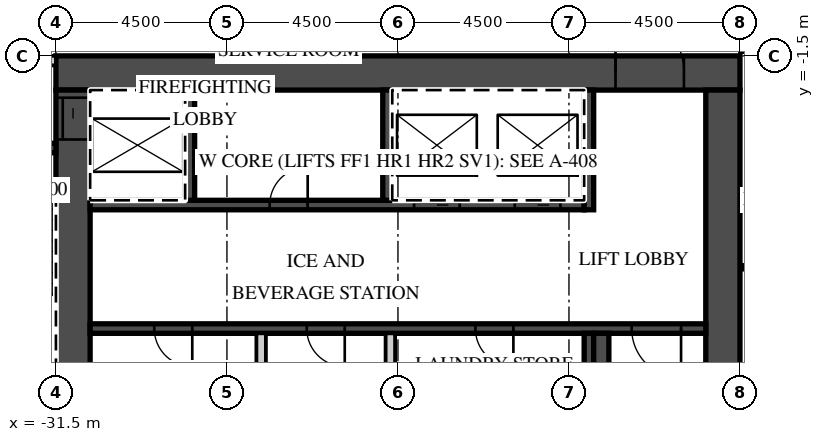
"""IFC4 building model, lengths in metres.
Left out: names, types, materials, properties, quantities, classifications, styles, units other than length and angle.
Written with IfcOpenShell. Run it as: python <this file> out.ifc"""

import sys

from ifc_helpers import new_model, si_unit, direction, frame, frame_2d, origin, place, context, subcontext, project, spatial, rectangle, extrude, element, fill, save


model = new_model("IFC4")
c1 = context("Model", 3, precision=1e-05, world=origin(), true_north=direction((0.0, 1.0)))
c2 = subcontext(c1, "Body", "Model", "MODEL_VIEW")
j1 = project(units=[si_unit("LENGTHUNIT", "METRE"), si_unit("PLANEANGLEUNIT", "RADIAN")], contexts=[c1])
p1 = place(None, origin())
s1 = spatial("IfcSite", under=j1, at=p1, CompositionType="ELEMENT")
p2 = place(p1, origin())
s2 = spatial("IfcBuilding", under=s1, at=p2, CompositionType="ELEMENT")
p3 = place(p2, frame((0.0, 0.0, 298.2)))
s3 = spatial("IfcBuildingStorey", under=s2, at=p3, CompositionType="ELEMENT", Elevation=298.2)
p4 = place(p3, frame((-13.5, -1.3, 0.0), z_axis=(0.0, 0.0, 1.0), x_axis=(1.0, 0.0, 0.0)))
e1 = element("IfcWall", 1, at=p4, inside=s3, PredefinedType="PARTITIONING", context=c2, shape_type="SweptSolid", body=[
    extrude(rectangle(XDim=50.293, YDim=0.2, at=frame_2d((25.146, 0.0))), origin(), (0.0, 0.0, 1.0), 3.02),
])
p5 = place(p4, frame((2.925, 0.0, 0.0)))
e2 = element("IfcOpeningElement", 2, at=p5, cuts=e1, PredefinedType="OPENING", context=c2, shape_type="SweptSolid", body=[
    extrude(rectangle(XDim=1.0, YDim=2.1, at=frame_2d((0.5, 1.05))), frame((0.0, 0.11, 0.0), z_axis=(0.0, -1.0, 0.0), x_axis=(1.0, 0.0, 0.0)), (0.0, 0.0, 1.0), 0.22),
])
p6 = place(p4, frame((7.45, 0.0, 0.0)))
e3 = element("IfcOpeningElement", 3, at=p6, cuts=e1, PredefinedType="OPENING", context=c2, shape_type="SweptSolid", body=[
    extrude(rectangle(XDim=1.0, YDim=2.1, at=frame_2d((0.5, 1.05))), frame((0.0, 0.11, 0.0), z_axis=(0.0, -1.0, 0.0), x_axis=(1.0, 0.0, 0.0)), (0.0, 0.0, 1.0), 0.22),
])
p7 = place(p4, frame((9.55, 0.0, 0.0)))
e4 = element("IfcOpeningElement", 4, at=p7, cuts=e1, PredefinedType="OPENING", context=c2, shape_type="SweptSolid", body=[
    extrude(rectangle(XDim=1.0, YDim=2.1, at=frame_2d((0.5, 1.05))), frame((0.0, 0.11, 0.0), z_axis=(0.0, -1.0, 0.0), x_axis=(1.0, 0.0, 0.0)), (0.0, 0.0, 1.0), 0.22),
])
p8 = place(p4, frame((18.862, 0.0, 0.0)))
e5 = element("IfcOpeningElement", 5, at=p8, cuts=e1, PredefinedType="OPENING", context=c2, shape_type="SweptSolid", body=[
    extrude(rectangle(XDim=1.2, YDim=2.1, at=frame_2d((0.6, 1.05))), frame((0.0, 0.11, 0.0), z_axis=(0.0, -1.0, 0.0), x_axis=(1.0, 0.0, 0.0)), (0.0, 0.0, 1.0), 0.22),
])
p9 = place(p4, frame((23.075, 0.0, 0.0)))
e6 = element("IfcOpeningElement", 6, at=p9, cuts=e1, PredefinedType="OPENING", context=c2, shape_type="SweptSolid", body=[
    extrude(rectangle(XDim=1.0, YDim=2.1, at=frame_2d((0.5, 1.05))), frame((0.0, 0.11, 0.0), z_axis=(0.0, -1.0, 0.0), x_axis=(1.0, 0.0, 0.0)), (0.0, 0.0, 1.0), 0.22),
])
p10 = place(p4, frame((29.925, 0.0, 0.0)))
e7 = element("IfcOpeningElement", 7, at=p10, cuts=e1, PredefinedType="OPENING", context=c2, shape_type="SweptSolid", body=[
    extrude(rectangle(XDim=1.0, YDim=2.1, at=frame_2d((0.5, 1.05))), frame((0.0, 0.11, 0.0), z_axis=(0.0, -1.0, 0.0), x_axis=(1.0, 0.0, 0.0)), (0.0, 0.0, 1.0), 0.22),
])
p11 = place(p4, frame((33.938, 0.0, 0.0)))
e8 = element("IfcOpeningElement", 8, at=p11, cuts=e1, PredefinedType="OPENING", context=c2, shape_type="SweptSolid", body=[
    extrude(rectangle(XDim=1.2, YDim=2.1, at=frame_2d((0.6, 1.05))), frame((0.0, 0.11, 0.0), z_axis=(0.0, -1.0, 0.0), x_axis=(1.0, 0.0, 0.0)), (0.0, 0.0, 1.0), 0.22),
])
p12 = place(p4, frame((43.45, 0.0, 0.0)))
e9 = element("IfcOpeningElement", 9, at=p12, cuts=e1, PredefinedType="OPENING", context=c2, shape_type="SweptSolid", body=[
    extrude(rectangle(XDim=1.0, YDim=2.1, at=frame_2d((0.5, 1.05))), frame((0.0, 0.11, 0.0), z_axis=(0.0, -1.0, 0.0), x_axis=(1.0, 0.0, 0.0)), (0.0, 0.0, 1.0), 0.22),
])
p13 = place(p4, frame((45.55, 0.0, 0.0)))
e10 = element("IfcOpeningElement", 10, at=p13, cuts=e1, PredefinedType="OPENING", context=c2, shape_type="SweptSolid", body=[
    extrude(rectangle(XDim=1.0, YDim=2.1, at=frame_2d((0.5, 1.05))), frame((0.0, 0.11, 0.0), z_axis=(0.0, -1.0, 0.0), x_axis=(1.0, 0.0, 0.0)), (0.0, 0.0, 1.0), 0.22),
])
p14 = place(p3, frame((-31.5, -1.95, 0.0), z_axis=(0.0, 0.0, 1.0), x_axis=(1.0, 0.0, 0.0)))
e11 = element("IfcWall", 11, at=p14, inside=s3, PredefinedType="SHEAR", context=c2, shape_type="SweptSolid", body=[
    extrude(rectangle(XDim=18.0, YDim=0.9, at=frame_2d((9.0, 0.0))), origin(), (0.0, 0.0, 1.0), 3.02),
])
p15 = place(p14, frame((14.725, 0.0, 0.0)))
e12 = element("IfcOpeningElement", 12, at=p15, cuts=e11, PredefinedType="OPENING", context=c2, shape_type="SweptSolid", body=[
    extrude(rectangle(XDim=1.8, YDim=2.1, at=frame_2d((0.9, 1.05))), frame((0.0, 0.46, 0.0), z_axis=(0.0, -1.0, 0.0), x_axis=(1.0, 0.0, 0.0)), (0.0, 0.0, 1.0), 0.92),
])
p16 = place(p3, frame((-31.05, -15.2, 0.0), z_axis=(0.0, 0.0, 1.0), x_axis=(0.0, 1.0, 0.0)))
e13 = element("IfcWall", 13, at=p16, inside=s3, PredefinedType="SHEAR", context=c2, shape_type="SweptSolid", body=[
    extrude(rectangle(XDim=12.8, YDim=0.9, at=frame_2d((6.4, 0.0))), origin(), (0.0, 0.0, 1.0), 3.02),
])
p17 = place(p16, frame((11.5, 0.0, 0.0)))
e14 = element("IfcOpeningElement", 14, at=p17, cuts=e13, PredefinedType="OPENING", context=c2, shape_type="SweptSolid", body=[
    extrude(rectangle(XDim=1.1, YDim=2.1, at=frame_2d((0.55, 1.05))), frame((0.0, 0.46, 0.0), z_axis=(0.0, -1.0, 0.0), x_axis=(1.0, 0.0, 0.0)), (0.0, 0.0, 1.0), 0.92),
])
p18 = place(p3, frame((-13.95, -14.6, 0.0), z_axis=(0.0, 0.0, 1.0), x_axis=(0.0, 1.0, 0.0)))
e15 = element("IfcWall", 15, at=p18, inside=s3, PredefinedType="SHEAR", context=c2, shape_type="SweptSolid", body=[
    extrude(rectangle(XDim=12.2, YDim=0.9, at=frame_2d((6.1, 0.0))), origin(), (0.0, 0.0, 1.0), 3.02),
])
p19 = place(p3, frame((-30.6, -5.425, 0.0), z_axis=(0.0, 0.0, 1.0), x_axis=(1.0, 0.0, 0.0)))
e16 = element("IfcWall", 16, at=p19, inside=s3, PredefinedType="SHEAR", context=c2, shape_type="SweptSolid", body=[
    extrude(rectangle(XDim=13.0, YDim=0.25, at=frame_2d((6.5, 0.0))), origin(), (0.0, 0.0, 1.0), 3.02),
])
p20 = place(p19, frame((8.525, 0.0, 0.0)))
e17 = element("IfcOpeningElement", 17, at=p20, cuts=e16, PredefinedType="OPENING", context=c2, shape_type="SweptSolid", body=[
    extrude(rectangle(XDim=1.2, YDim=2.1, at=frame_2d((0.6, 1.05))), frame((0.0, 0.135, 0.0), z_axis=(0.0, -1.0, 0.0), x_axis=(1.0, 0.0, 0.0)), (0.0, 0.0, 1.0), 0.27),
])
p21 = place(p19, frame((11.175, 0.0, 0.0)))
e18 = element("IfcOpeningElement", 18, at=p21, cuts=e16, PredefinedType="OPENING", context=c2, shape_type="SweptSolid", body=[
    extrude(rectangle(XDim=1.2, YDim=2.1, at=frame_2d((0.6, 1.05))), frame((0.0, 0.135, 0.0), z_axis=(0.0, -1.0, 0.0), x_axis=(1.0, 0.0, 0.0)), (0.0, 0.0, 1.0), 0.27),
])
p22 = place(p19, frame((4.725, 0.0, 0.0)))
e19 = element("IfcOpeningElement", 19, at=p22, cuts=e16, PredefinedType="OPENING", context=c2, shape_type="SweptSolid", body=[
    extrude(rectangle(XDim=1.0, YDim=2.1, at=frame_2d((0.5, 1.05))), frame((0.0, 0.135, 0.0), z_axis=(0.0, -1.0, 0.0), x_axis=(1.0, 0.0, 0.0)), (0.0, 0.0, 1.0), 0.27),
])
p23 = place(p3, frame((-17.475, -5.55, 0.0), z_axis=(0.0, 0.0, 1.0), x_axis=(0.0, 1.0, 0.0)))
e20 = element("IfcWall", 20, at=p23, inside=s3, PredefinedType="SHEAR", context=c2, shape_type="SweptSolid", body=[
    extrude(rectangle(XDim=3.15, YDim=0.25, at=frame_2d((1.575, 0.0))), origin(), (0.0, 0.0, 1.0), 3.02),
])
for number, where, z_axis, x_axis in (
    (21, (-27.975, -5.3, 0.0), (0.0, 0.0, 1.0), (0.0, 1.0, 0.0)),
    (22, (-22.775, -5.3, 0.0), (0.0, 0.0, 1.0), (0.0, 1.0, 0.0)),
):
    element("IfcWall", number, at=place(p3, frame(where, z_axis=z_axis, x_axis=x_axis)), inside=s3, PredefinedType="SHEAR", context=c2, shape_type="SweptSolid", body=[
        extrude(rectangle(XDim=2.9, YDim=0.25, at=frame_2d((1.45, 0.0))), origin(), (0.0, 0.0, 1.0), 3.02),
    ])
p24 = place(p3, frame((-30.6, -8.675, 0.0), z_axis=(0.0, 0.0, 1.0), x_axis=(1.0, 0.0, 0.0)))
e23 = element("IfcWall", 23, at=p24, inside=s3, PredefinedType="SHEAR", context=c2, shape_type="SweptSolid", body=[
    extrude(rectangle(XDim=16.2, YDim=0.25, at=frame_2d((8.1, 0.0))), origin(), (0.0, 0.0, 1.0), 3.02),
])
p25 = place(p24, frame((14.25, 0.0, 0.0)))
e24 = element("IfcOpeningElement", 24, at=p25, cuts=e23, PredefinedType="OPENING", context=c2, shape_type="SweptSolid", body=[
    extrude(rectangle(XDim=1.3, YDim=2.1, at=frame_2d((0.65, 1.05))), frame((0.0, 0.135, 0.0), z_axis=(0.0, -1.0, 0.0), x_axis=(1.0, 0.0, 0.0)), (0.0, 0.0, 1.0), 0.27),
])
p26 = place(p24, frame((1.688, 0.0, 0.0)))
e25 = element("IfcOpeningElement", 25, at=p26, cuts=e23, PredefinedType="OPENING", context=c2, shape_type="SweptSolid", body=[
    extrude(rectangle(XDim=1.0, YDim=2.1, at=frame_2d((0.5, 1.05))), frame((0.0, 0.135, 0.0), z_axis=(0.0, -1.0, 0.0), x_axis=(1.0, 0.0, 0.0)), (0.0, 0.0, 1.0), 0.27),
])
p27 = place(p24, frame((5.7, 0.0, 0.0)))
e26 = element("IfcOpeningElement", 26, at=p27, cuts=e23, PredefinedType="OPENING", context=c2, shape_type="SweptSolid", body=[
    extrude(rectangle(XDim=1.0, YDim=2.1, at=frame_2d((0.5, 1.05))), frame((0.0, 0.135, 0.0), z_axis=(0.0, -1.0, 0.0), x_axis=(1.0, 0.0, 0.0)), (0.0, 0.0, 1.0), 0.27),
])
p28 = place(p24, frame((10.137, 0.0, 0.0)))
e27 = element("IfcOpeningElement", 27, at=p28, cuts=e23, PredefinedType="OPENING", context=c2, shape_type="SweptSolid", body=[
    extrude(rectangle(XDim=1.0, YDim=2.1, at=frame_2d((0.5, 1.05))), frame((0.0, 0.135, 0.0), z_axis=(0.0, -1.0, 0.0), x_axis=(1.0, 0.0, 0.0)), (0.0, 0.0, 1.0), 0.27),
])
p29 = place(p3, frame((-17.475, -11.7, 0.0), z_axis=(0.0, 0.0, 1.0), x_axis=(0.0, 1.0, 0.0)))
e28 = element("IfcWall", 28, at=p29, inside=s3, PredefinedType="SHEAR", context=c2, shape_type="SweptSolid", body=[
    extrude(rectangle(XDim=2.9, YDim=0.25, at=frame_2d((1.45, 0.0))), origin(), (0.0, 0.0, 1.0), 3.02),
])
for number, where, z_axis, x_axis in (
    (29, (-26.1, -11.7, 0.0), (0.0, 0.0, 1.0), (0.0, 1.0, 0.0)),
    (30, (-22.7, -11.7, 0.0), (0.0, 0.0, 1.0), (0.0, 1.0, 0.0)),
):
    element("IfcWall", number, at=place(p3, frame(where, z_axis=z_axis, x_axis=x_axis)), inside=s3, PredefinedType="PARTITIONING", context=c2, shape_type="SweptSolid", body=[
        extrude(rectangle(XDim=2.9, YDim=0.25, at=frame_2d((1.45, 0.0))), origin(), (0.0, 0.0, 1.0), 3.02),
    ])
p30 = place(p3, frame((-17.15, -14.6, 0.0), z_axis=(0.0, 0.0, 1.0), x_axis=(0.0, 1.0, 0.0)))
e31 = element("IfcWall", 31, at=p30, inside=s3, PredefinedType="SHEAR", context=c2, shape_type="SweptSolid", body=[
    extrude(rectangle(XDim=5.8, YDim=0.4, at=frame_2d((2.9, 0.0))), origin(), (0.0, 0.0, 1.0), 3.02),
])
p31 = place(p3, frame((-39.627, -1.625, 0.0), z_axis=(0.0, 0.0, 1.0), x_axis=(1.0, 0.0, 0.0)))
e32 = element("IfcWall", 32, at=p31, inside=s3, PredefinedType="PARTITIONING", context=c2, shape_type="SweptSolid", body=[
    extrude(rectangle(XDim=8.127, YDim=0.25, at=frame_2d((4.063, 0.0))), origin(), (0.0, 0.0, 1.0), 3.02),
])
p32 = place(p31, frame((6.202, 0.0, 0.0)))
e33 = element("IfcOpeningElement", 33, at=p32, cuts=e32, PredefinedType="OPENING", context=c2, shape_type="SweptSolid", body=[
    extrude(rectangle(XDim=1.3, YDim=2.1, at=frame_2d((0.65, 1.05))), frame((0.0, 0.135, 0.0), z_axis=(0.0, -1.0, 0.0), x_axis=(1.0, 0.0, 0.0)), (0.0, 0.0, 1.0), 0.27),
])
p33 = place(p31, frame((3.777, 0.0, 0.0)))
e34 = element("IfcOpeningElement", 34, at=p33, cuts=e32, PredefinedType="OPENING", context=c2, shape_type="SweptSolid", body=[
    extrude(rectangle(XDim=1.1, YDim=2.1, at=frame_2d((0.55, 1.05))), frame((0.0, 0.135, 0.0), z_axis=(0.0, -1.0, 0.0), x_axis=(1.0, 0.0, 0.0)), (0.0, 0.0, 1.0), 0.27),
])
p34 = place(p3, frame((-34.05, -3.925, 0.0), z_axis=(0.0, 0.0, 1.0), x_axis=(1.0, 0.0, 0.0)))
e35 = element("IfcWall", 35, at=p34, inside=s3, PredefinedType="SHEAR", context=c2, shape_type="SweptSolid", body=[
    extrude(rectangle(XDim=2.55, YDim=0.25, at=frame_2d((1.275, 0.0))), origin(), (0.0, 0.0, 1.0), 3.02),
])
p35 = place(p34, frame((0.625, 0.0, 0.0)))
e36 = element("IfcOpeningElement", 36, at=p35, cuts=e35, PredefinedType="OPENING", context=c2, shape_type="SweptSolid", body=[
    extrude(rectangle(XDim=1.3, YDim=2.1, at=frame_2d((0.65, 1.05))), frame((0.0, 0.135, 0.0), z_axis=(0.0, -1.0, 0.0), x_axis=(1.0, 0.0, 0.0)), (0.0, 0.0, 1.0), 0.27),
])
p36 = place(p20, origin())
e37 = element("IfcDoor", 37, at=p36, inside=s3, OperationType="SLIDING_TO_LEFT", PredefinedType="DOOR", context=c2, shape_type="SweptSolid", body=[
    extrude(rectangle(XDim=1.2, YDim=2.1, at=frame_2d((0.6, 1.05))), frame((0.0, 0.025, 0.0), z_axis=(0.0, -1.0, 0.0), x_axis=(1.0, 0.0, 0.0)), (0.0, 0.0, 1.0), 0.05),
])
fill(e17, e37)
p37 = place(p21, origin())
e38 = element("IfcDoor", 38, at=p37, inside=s3, OperationType="SLIDING_TO_RIGHT", PredefinedType="DOOR", context=c2, shape_type="SweptSolid", body=[
    extrude(rectangle(XDim=1.2, YDim=2.1, at=frame_2d((0.6, 1.05))), frame((0.0, 0.025, 0.0), z_axis=(0.0, -1.0, 0.0), x_axis=(1.0, 0.0, 0.0)), (0.0, 0.0, 1.0), 0.05),
])
fill(e18, e38)
p38 = place(p17, origin())
e39 = element("IfcDoor", 39, at=p38, inside=s3, OperationType="SLIDING_TO_RIGHT", PredefinedType="DOOR", context=c2, shape_type="SweptSolid", body=[
    extrude(rectangle(XDim=1.1, YDim=2.1, at=frame_2d((0.55, 1.05))), frame((0.0, 0.025, 0.0), z_axis=(0.0, -1.0, 0.0), x_axis=(1.0, 0.0, 0.0)), (0.0, 0.0, 1.0), 0.05),
])
fill(e14, e39)
p39 = place(p15, origin())
e40 = element("IfcDoor", 40, at=p39, inside=s3, OperationType="DOUBLE_DOOR_DOUBLE_SWING", PredefinedType="DOOR", context=c2, shape_type="SweptSolid", body=[
    extrude(rectangle(XDim=1.8, YDim=2.1, at=frame_2d((0.9, 1.05))), frame((0.0, 0.025, 0.0), z_axis=(0.0, -1.0, 0.0), x_axis=(1.0, 0.0, 0.0)), (0.0, 0.0, 1.0), 0.05),
])
fill(e12, e40)
p40 = place(p25, origin())
e41 = element("IfcDoor", 41, at=p40, inside=s3, OperationType="SINGLE_SWING_RIGHT", PredefinedType="DOOR", context=c2, shape_type="SweptSolid", body=[
    extrude(rectangle(XDim=1.3, YDim=2.1, at=frame_2d((0.65, 1.05))), frame((0.0, 0.025, 0.0), z_axis=(0.0, -1.0, 0.0), x_axis=(1.0, 0.0, 0.0)), (0.0, 0.0, 1.0), 0.05),
])
fill(e24, e41)
p41 = place(p26, origin())
e42 = element("IfcDoor", 42, at=p41, inside=s3, OperationType="SINGLE_SWING_RIGHT", PredefinedType="DOOR", context=c2, shape_type="SweptSolid", body=[
    extrude(rectangle(XDim=1.0, YDim=2.1, at=frame_2d((0.5, 1.05))), frame((0.0, 0.025, 0.0), z_axis=(0.0, -1.0, 0.0), x_axis=(1.0, 0.0, 0.0)), (0.0, 0.0, 1.0), 0.05),
])
fill(e25, e42)
p42 = place(p27, origin())
e43 = element("IfcDoor", 43, at=p42, inside=s3, OperationType="SINGLE_SWING_RIGHT", PredefinedType="DOOR", context=c2, shape_type="SweptSolid", body=[
    extrude(rectangle(XDim=1.0, YDim=2.1, at=frame_2d((0.5, 1.05))), frame((0.0, 0.025, 0.0), z_axis=(0.0, -1.0, 0.0), x_axis=(1.0, 0.0, 0.0)), (0.0, 0.0, 1.0), 0.05),
])
fill(e26, e43)
p43 = place(p28, origin())
e44 = element("IfcDoor", 44, at=p43, inside=s3, OperationType="SINGLE_SWING_RIGHT", PredefinedType="DOOR", context=c2, shape_type="SweptSolid", body=[
    extrude(rectangle(XDim=1.0, YDim=2.1, at=frame_2d((0.5, 1.05))), frame((0.0, 0.025, 0.0), z_axis=(0.0, -1.0, 0.0), x_axis=(1.0, 0.0, 0.0)), (0.0, 0.0, 1.0), 0.05),
])
fill(e27, e44)
p44 = place(p22, origin())
e45 = element("IfcDoor", 45, at=p44, inside=s3, OperationType="SINGLE_SWING_RIGHT", PredefinedType="DOOR", context=c2, shape_type="SweptSolid", body=[
    extrude(rectangle(XDim=1.0, YDim=2.1, at=frame_2d((0.5, 1.05))), frame((0.0, 0.025, 0.0), z_axis=(0.0, -1.0, 0.0), x_axis=(1.0, 0.0, 0.0)), (0.0, 0.0, 1.0), 0.05),
])
fill(e19, e45)
save(model, sys.argv[1])
